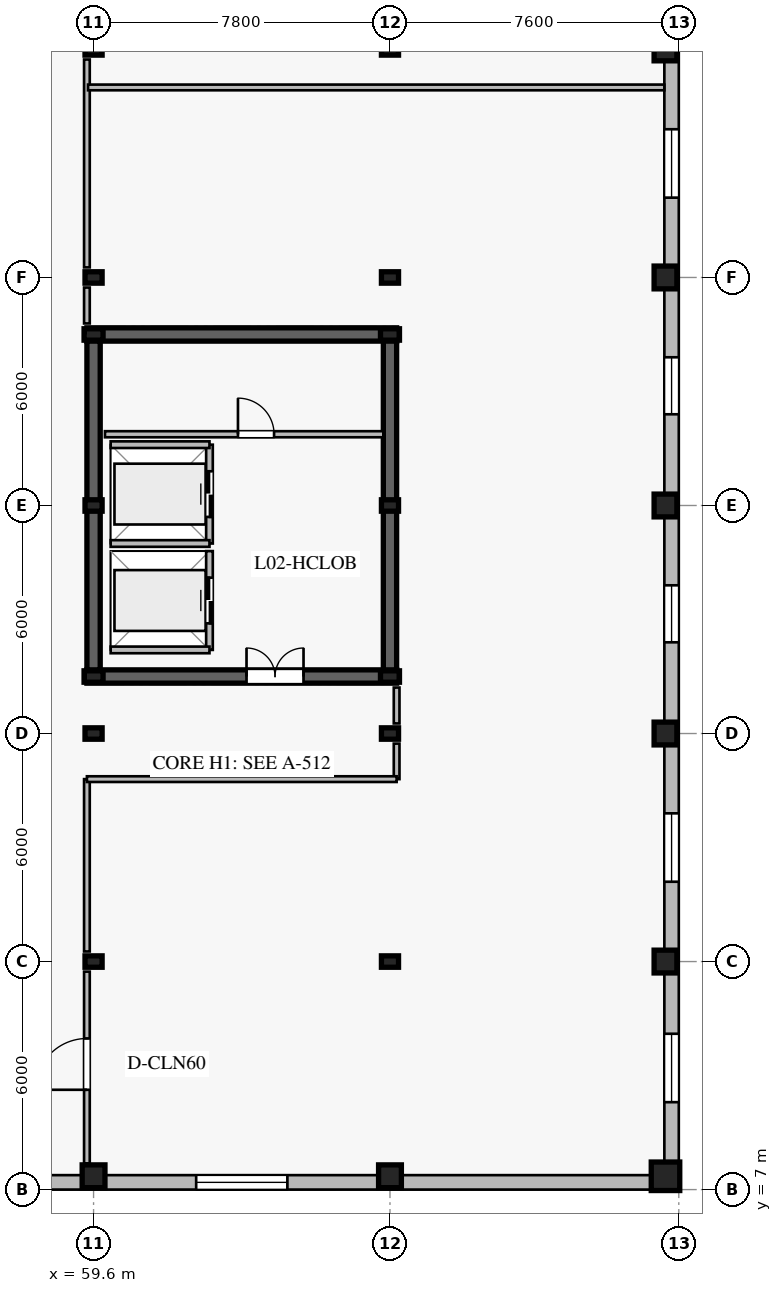
"""IFC4 building model, lengths in metres.
Left out: names, types, materials, properties, quantities, classifications, styles, units other than length and angle.
Written with IfcOpenShell. Run it as: python <this file> out.ifc"""

import sys

from ifc_helpers import new_model, si_unit, direction, frame, frame_2d, origin, origin_2d, place, context, subcontext, project, spatial, rectangle, i_section, extrude, element, fill, save


model = new_model("IFC4")
c1 = context("Model", 3, precision=1e-05, world=origin(), true_north=direction((0.0, 1.0)))
c2 = subcontext(c1, "Body", "Model", "MODEL_VIEW")
j1 = project(units=[si_unit("LENGTHUNIT", "METRE"), si_unit("PLANEANGLEUNIT", "RADIAN")], contexts=[c1])
p1 = place(None, origin())
s1 = spatial("IfcSite", under=j1, at=p1, CompositionType="ELEMENT")
p2 = place(p1, origin())
s2 = spatial("IfcBuilding", under=s1, at=p2, CompositionType="ELEMENT")
p3 = place(p2, frame((0.0, 0.0, 9.8)))
s3 = spatial("IfcBuildingStorey", under=s2, at=p3, CompositionType="ELEMENT", Elevation=9.8)
p4 = place(p3, frame((59.425, 20.5, 0.0), z_axis=(0.0, 0.0, 1.0), x_axis=(1.0, 0.0, 0.0)))
e1 = element("IfcWall", 1, at=p4, inside=s3, PredefinedType="SHEAR", context=c2, shape_type="SweptSolid", body=[
    extrude(rectangle(XDim=8.15, YDim=0.35, at=frame_2d((4.075, 0.0))), origin(), (0.0, 0.0, 1.0), 4.34),
])
p5 = place(p4, frame((4.2, 0.0, 0.0)))
e2 = element("IfcOpeningElement", 2, at=p5, cuts=e1, PredefinedType="OPENING", context=c2, shape_type="SweptSolid", body=[
    extrude(rectangle(XDim=1.5, YDim=2.2, at=frame_2d((0.75, 1.1))), frame((0.0, 0.185, 0.0), z_axis=(0.0, -1.0, 0.0), x_axis=(1.0, 0.0, 0.0)), (0.0, 0.0, 1.0), 0.37),
])
p6 = place(p3, frame((67.575, 29.5, 0.0), z_axis=(0.0, 0.0, 1.0), x_axis=(-1.0, 0.0, 0.0)))
e3 = element("IfcWall", 3, at=p6, inside=s3, PredefinedType="SHEAR", context=c2, shape_type="SweptSolid", body=[
    extrude(rectangle(XDim=8.15, YDim=0.35, at=frame_2d((4.075, 0.0))), origin(), (0.0, 0.0, 1.0), 4.34),
])
for number, where, z_axis, x_axis in (
    (4, (59.6, 29.325, 0.0), (0.0, 0.0, 1.0), (0.0, -1.0, 0.0)),
    (5, (67.4, 20.675, 0.0), (0.0, 0.0, 1.0), (0.0, 1.0, 0.0)),
):
    element("IfcWall", number, at=place(p3, frame(where, z_axis=z_axis, x_axis=x_axis)), inside=s3, PredefinedType="SHEAR", context=c2, shape_type="SweptSolid", body=[
        extrude(rectangle(XDim=8.65, YDim=0.35, at=frame_2d((4.325, 0.0))), origin(), (0.0, 0.0, 1.0), 4.34),
    ])
for number, where, z_axis, x_axis in (
    (6, (59.6, 20.5, 0.0), (0.0, 0.0, 1.0), (1.0, 0.0, 0.0)),
    (7, (67.4, 20.5, 0.0), (0.0, 0.0, 1.0), (1.0, 0.0, 0.0)),
    (8, (67.4, 29.5, 0.0), (0.0, 0.0, 1.0), (1.0, 0.0, 0.0)),
    (9, (59.6, 29.5, 0.0), (0.0, 0.0, 1.0), (1.0, 0.0, 0.0)),
):
    element("IfcColumn", number, at=place(p3, frame(where, z_axis=z_axis, x_axis=x_axis)), inside=s3, PredefinedType="COLUMN", context=c2, shape_type="SweptSolid", body=[
        extrude(i_section(OverallWidth=0.3, OverallDepth=0.5, WebThickness=0.014, FlangeThickness=0.028, at=origin_2d()), origin(), (0.0, 0.0, 1.0), 4.6),
    ])
p7 = place(p3, frame((59.6, 7.35, 0.0), z_axis=(0.0, 0.0, 1.0), x_axis=(1.0, 0.0, 0.0)))
e10 = element("IfcColumn", 10, at=p7, inside=s3, PredefinedType="COLUMN", context=c2, shape_type="SweptSolid", body=[
    extrude(rectangle(XDim=0.6, YDim=0.6, at=origin_2d()), origin(), (0.0, 0.0, 1.0), 4.6),
])
for number, where, z_axis, x_axis in (
    (11, (59.6, 13.0, 0.0), (0.0, 0.0, 1.0), (1.0, 0.0, 0.0)),
    (12, (59.6, 19.0, 0.0), (0.0, 0.0, 1.0), (1.0, 0.0, 0.0)),
    (13, (59.6, 25.0, 0.0), (0.0, 0.0, 1.0), (1.0, 0.0, 0.0)),
    (14, (59.6, 31.0, 0.0), (0.0, 0.0, 1.0), (1.0, 0.0, 0.0)),
    (15, (59.6, 37.0, 0.0), (0.0, 0.0, 1.0), (1.0, 0.0, 0.0)),
):
    element("IfcColumn", number, at=place(p3, frame(where, z_axis=z_axis, x_axis=x_axis)), inside=s3, PredefinedType="COLUMN", context=c2, shape_type="SweptSolid", body=[
        extrude(i_section(OverallWidth=0.3, OverallDepth=0.45, WebThickness=0.014, FlangeThickness=0.026, at=origin_2d()), origin(), (0.0, 0.0, 1.0), 4.6),
    ])
p8 = place(p3, frame((67.4, 7.35, 0.0), z_axis=(0.0, 0.0, 1.0), x_axis=(1.0, 0.0, 0.0)))
e16 = element("IfcColumn", 16, at=p8, inside=s3, PredefinedType="COLUMN", context=c2, shape_type="SweptSolid", body=[
    extrude(rectangle(XDim=0.6, YDim=0.6, at=origin_2d()), origin(), (0.0, 0.0, 1.0), 4.6),
])
for number, where, z_axis, x_axis in (
    (17, (67.4, 13.0, 0.0), (0.0, 0.0, 1.0), (1.0, 0.0, 0.0)),
    (18, (67.4, 19.0, 0.0), (0.0, 0.0, 1.0), (1.0, 0.0, 0.0)),
    (19, (67.4, 25.0, 0.0), (0.0, 0.0, 1.0), (1.0, 0.0, 0.0)),
    (20, (67.4, 31.0, 0.0), (0.0, 0.0, 1.0), (1.0, 0.0, 0.0)),
    (21, (67.4, 37.0, 0.0), (0.0, 0.0, 1.0), (1.0, 0.0, 0.0)),
):
    element("IfcColumn", number, at=place(p3, frame(where, z_axis=z_axis, x_axis=x_axis)), inside=s3, PredefinedType="COLUMN", context=c2, shape_type="SweptSolid", body=[
        extrude(i_section(OverallWidth=0.3, OverallDepth=0.45, WebThickness=0.014, FlangeThickness=0.026, at=origin_2d()), origin(), (0.0, 0.0, 1.0), 4.6),
    ])
p9 = place(p3, frame((74.65, 7.35, 0.0), z_axis=(0.0, 0.0, 1.0), x_axis=(1.0, 0.0, 0.0)))
e22 = element("IfcColumn", 22, at=p9, inside=s3, PredefinedType="COLUMN", context=c2, shape_type="SweptSolid", body=[
    extrude(rectangle(XDim=0.75, YDim=0.75, at=origin_2d()), origin(), (0.0, 0.0, 1.0), 4.6),
])
for number, where, z_axis, x_axis in (
    (23, (74.65, 13.0, 0.0), (0.0, 0.0, 1.0), (1.0, 0.0, 0.0)),
    (24, (74.65, 19.0, 0.0), (0.0, 0.0, 1.0), (1.0, 0.0, 0.0)),
    (25, (74.65, 25.0, 0.0), (0.0, 0.0, 1.0), (1.0, 0.0, 0.0)),
    (26, (74.65, 31.0, 0.0), (0.0, 0.0, 1.0), (1.0, 0.0, 0.0)),
    (27, (74.65, 37.0, 0.0), (0.0, 0.0, 1.0), (1.0, 0.0, 0.0)),
):
    element("IfcColumn", number, at=place(p3, frame(where, z_axis=z_axis, x_axis=x_axis)), inside=s3, PredefinedType="COLUMN", context=c2, shape_type="SweptSolid", body=[
        extrude(rectangle(XDim=0.6, YDim=0.6, at=origin_2d()), origin(), (0.0, 0.0, 1.0), 4.6),
    ])
p10 = place(p3, frame((75.0, 7.19, 0.0), z_axis=(0.0, 0.0, 1.0), x_axis=(-1.0, 0.0, 0.0)))
e28 = element("IfcWall", 28, at=p10, inside=s3, PredefinedType="STANDARD", context=c2, shape_type="SweptSolid", body=[
    extrude(rectangle(XDim=23.0, YDim=0.38, at=frame_2d((11.5, 0.0))), origin(), (0.0, 0.0, 1.0), 4.34),
])
p11 = place(p10, frame((10.3, 0.0, 0.95)))
e29 = element("IfcOpeningElement", 29, at=p11, cuts=e28, PredefinedType="OPENING", context=c2, shape_type="SweptSolid", body=[
    extrude(rectangle(XDim=2.4, YDim=1.8, at=frame_2d((1.2, 0.9))), frame((0.0, 0.2, 0.0), z_axis=(0.0, -1.0, 0.0), x_axis=(1.0, 0.0, 0.0)), (0.0, 0.0, 1.0), 0.4),
])
p12 = place(p3, frame((74.81, 42.62, 0.0), z_axis=(0.0, 0.0, 1.0), x_axis=(0.0, -1.0, 0.0)))
e30 = element("IfcWall", 30, at=p12, inside=s3, PredefinedType="STANDARD", context=c2, shape_type="SweptSolid", body=[
    extrude(rectangle(XDim=35.24, YDim=0.38, at=frame_2d((17.62, 0.0))), origin(), (0.0, 0.0, 1.0), 4.34),
])
p13 = place(p12, frame((31.52, 0.0, 0.9)))
e31 = element("IfcOpeningElement", 31, at=p13, cuts=e30, PredefinedType="OPENING", context=c2, shape_type="SweptSolid", body=[
    extrude(rectangle(XDim=1.8, YDim=1.8, at=frame_2d((0.9, 0.9))), frame((0.0, 0.2, 0.0), z_axis=(0.0, -1.0, 0.0), x_axis=(1.0, 0.0, 0.0)), (0.0, 0.0, 1.0), 0.4),
])
p14 = place(p12, frame((25.72, 0.0, 0.9)))
e32 = element("IfcOpeningElement", 32, at=p14, cuts=e30, PredefinedType="OPENING", context=c2, shape_type="SweptSolid", body=[
    extrude(rectangle(XDim=1.8, YDim=1.8, at=frame_2d((0.9, 0.9))), frame((0.0, 0.2, 0.0), z_axis=(0.0, -1.0, 0.0), x_axis=(1.0, 0.0, 0.0)), (0.0, 0.0, 1.0), 0.4),
])
p15 = place(p12, frame((19.72, 0.0, 0.9)))
e33 = element("IfcOpeningElement", 33, at=p15, cuts=e30, PredefinedType="OPENING", context=c2, shape_type="SweptSolid", body=[
    extrude(rectangle(XDim=1.5, YDim=1.5, at=frame_2d((0.75, 0.75))), frame((0.0, 0.2, 0.0), z_axis=(0.0, -1.0, 0.0), x_axis=(1.0, 0.0, 0.0)), (0.0, 0.0, 1.0), 0.4),
])
p16 = place(p12, frame((13.72, 0.0, 0.9)))
e34 = element("IfcOpeningElement", 34, at=p16, cuts=e30, PredefinedType="OPENING", context=c2, shape_type="SweptSolid", body=[
    extrude(rectangle(XDim=1.5, YDim=1.5, at=frame_2d((0.75, 0.75))), frame((0.0, 0.2, 0.0), z_axis=(0.0, -1.0, 0.0), x_axis=(1.0, 0.0, 0.0)), (0.0, 0.0, 1.0), 0.4),
])
p17 = place(p12, frame((7.72, 0.0, 0.9)))
e35 = element("IfcOpeningElement", 35, at=p17, cuts=e30, PredefinedType="OPENING", context=c2, shape_type="SweptSolid", body=[
    extrude(rectangle(XDim=1.8, YDim=1.8, at=frame_2d((0.9, 0.9))), frame((0.0, 0.2, 0.0), z_axis=(0.0, -1.0, 0.0), x_axis=(1.0, 0.0, 0.0)), (0.0, 0.0, 1.0), 0.4),
])
p18 = place(p12, frame((1.92, 0.0, 0.9)))
e36 = element("IfcOpeningElement", 36, at=p18, cuts=e30, PredefinedType="OPENING", context=c2, shape_type="SweptSolid", body=[
    extrude(rectangle(XDim=1.8, YDim=1.8, at=frame_2d((0.9, 0.9))), frame((0.0, 0.2, 0.0), z_axis=(0.0, -1.0, 0.0), x_axis=(1.0, 0.0, 0.0)), (0.0, 0.0, 1.0), 0.4),
])
p19 = place(p3, frame((62.65, 21.2, 0.0), z_axis=(0.0, 0.0, 1.0), x_axis=(0.0, 1.0, 0.0)))
e37 = element("IfcWall", 37, at=p19, inside=s3, PredefinedType="PARTITIONING", context=c2, shape_type="SweptSolid", body=[
    extrude(rectangle(XDim=2.6, YDim=0.175, at=frame_2d((1.3, 0.0))), origin(), (0.0, 0.0, 1.0), 4.34),
])
p20 = place(p19, frame((0.7, 0.0, 0.0)))
e38 = element("IfcOpeningElement", 38, at=p20, cuts=e37, PredefinedType="OPENING", context=c2, shape_type="SweptSolid", body=[
    extrude(rectangle(XDim=1.2, YDim=2.2, at=frame_2d((0.6, 1.1))), frame((0.0, 0.098, 0.0), z_axis=(0.0, -1.0, 0.0), x_axis=(1.0, 0.0, 0.0)), (0.0, 0.0, 1.0), 0.195),
])
p21 = place(p3, frame((60.05, 21.2, 0.0), z_axis=(0.0, 0.0, 1.0), x_axis=(1.0, 0.0, 0.0)))
e39 = element("IfcWall", 39, at=p21, inside=s3, PredefinedType="PARTITIONING", context=c2, shape_type="SweptSolid", body=[
    extrude(rectangle(XDim=2.6, YDim=0.175, at=frame_2d((1.3, 0.0))), origin(), (0.0, 0.0, 1.0), 4.34),
])
p22 = place(p3, frame((62.65, 24.0, 0.0), z_axis=(0.0, 0.0, 1.0), x_axis=(0.0, 1.0, 0.0)))
e40 = element("IfcWall", 40, at=p22, inside=s3, PredefinedType="PARTITIONING", context=c2, shape_type="SweptSolid", body=[
    extrude(rectangle(XDim=2.6, YDim=0.175, at=frame_2d((1.3, 0.0))), origin(), (0.0, 0.0, 1.0), 3.98),
])
p23 = place(p22, frame((0.7, 0.0, 0.0)))
e41 = element("IfcOpeningElement", 41, at=p23, cuts=e40, PredefinedType="OPENING", context=c2, shape_type="SweptSolid", body=[
    extrude(rectangle(XDim=1.2, YDim=2.2, at=frame_2d((0.6, 1.1))), frame((0.0, 0.098, 0.0), z_axis=(0.0, -1.0, 0.0), x_axis=(1.0, 0.0, 0.0)), (0.0, 0.0, 1.0), 0.195),
])
for number, where, z_axis, x_axis in (
    (42, (60.05, 24.0, 0.0), (0.0, 0.0, 1.0), (1.0, 0.0, 0.0)),
    (43, (60.05, 26.6, 0.0), (0.0, 0.0, 1.0), (1.0, 0.0, 0.0)),
):
    element("IfcWall", number, at=place(p3, frame(where, z_axis=z_axis, x_axis=x_axis)), inside=s3, PredefinedType="PARTITIONING", context=c2, shape_type="SweptSolid", body=[
        extrude(rectangle(XDim=2.6, YDim=0.175, at=frame_2d((1.3, 0.0))), origin(), (0.0, 0.0, 1.0), 4.34),
    ])
p24 = place(p3, frame((59.9, 26.875, 0.0), z_axis=(0.0, 0.0, 1.0), x_axis=(1.0, 0.0, 0.0)))
e44 = element("IfcWall", 44, at=p24, inside=s3, PredefinedType="PLUMBINGWALL", context=c2, shape_type="SweptSolid", body=[
    extrude(rectangle(XDim=7.325, YDim=0.16, at=frame_2d((3.663, 0.0))), origin(), (0.0, 0.0, 1.0), 3.98),
])
p25 = place(p24, frame((3.5, 0.0, 0.0)))
e45 = element("IfcOpeningElement", 45, at=p25, cuts=e44, PredefinedType="OPENING", context=c2, shape_type="SweptSolid", body=[
    extrude(rectangle(XDim=0.95, YDim=2.1, at=frame_2d((0.475, 1.05))), frame((0.0, 0.09, 0.0), z_axis=(0.0, -1.0, 0.0), x_axis=(1.0, 0.0, 0.0)), (0.0, 0.0, 1.0), 0.18),
])
p26 = place(p3, frame((59.425, 7.69, 0.0), z_axis=(0.0, 0.0, 1.0), x_axis=(0.0, 1.0, 0.0)))
e46 = element("IfcWall", 46, at=p26, inside=s3, PredefinedType="PARTITIONING", context=c2, shape_type="SweptSolid", body=[
    extrude(rectangle(XDim=5.045, YDim=0.15, at=frame_2d((2.522, 0.0))), origin(), (0.0, 0.0, 1.0), 3.98),
])
p27 = place(p26, frame((1.936, 0.0, 0.0)))
e47 = element("IfcOpeningElement", 47, at=p27, cuts=e46, PredefinedType="OPENING", context=c2, shape_type="SweptSolid", body=[
    extrude(rectangle(XDim=1.35, YDim=2.2, at=frame_2d((0.675, 1.1))), frame((0.0, 0.085, 0.0), z_axis=(0.0, -1.0, 0.0), x_axis=(1.0, 0.0, 0.0)), (0.0, 0.0, 1.0), 0.17),
])
p28 = place(p3, frame((59.425, 13.265, 0.0), z_axis=(0.0, 0.0, 1.0), x_axis=(0.0, 1.0, 0.0)))
e48 = element("IfcWall", 48, at=p28, inside=s3, PredefinedType="PARTITIONING", context=c2, shape_type="SweptSolid", body=[
    extrude(rectangle(XDim=4.535, YDim=0.15, at=frame_2d((2.268, 0.0))), origin(), (0.0, 0.0, 1.0), 3.98),
])
p29 = place(p3, frame((59.425, 29.79, 0.0), z_axis=(0.0, 0.0, 1.0), x_axis=(0.0, 1.0, 0.0)))
e49 = element("IfcWall", 49, at=p29, inside=s3, PredefinedType="PARTITIONING", context=c2, shape_type="SweptSolid", body=[
    extrude(rectangle(XDim=0.945, YDim=0.15, at=frame_2d((0.473, 0.0))), origin(), (0.0, 0.0, 1.0), 3.98),
])
p30 = place(p3, frame((59.425, 31.265, 0.0), z_axis=(0.0, 0.0, 1.0), x_axis=(0.0, 1.0, 0.0)))
e50 = element("IfcWall", 50, at=p30, inside=s3, PredefinedType="PARTITIONING", context=c2, shape_type="SweptSolid", body=[
    extrude(rectangle(XDim=5.47, YDim=0.15, at=frame_2d((2.735, 0.0))), origin(), (0.0, 0.0, 1.0), 3.98),
])
p31 = place(p3, frame((67.575, 17.8, 0.0), z_axis=(0.0, 0.0, 1.0), x_axis=(0.0, 1.0, 0.0)))
e51 = element("IfcWall", 51, at=p31, inside=s3, PredefinedType="PARTITIONING", context=c2, shape_type="SweptSolid", body=[
    extrude(rectangle(XDim=0.935, YDim=0.15, at=frame_2d((0.468, 0.0))), origin(), (0.0, 0.0, 1.0), 3.98),
])
p32 = place(p3, frame((67.575, 19.265, 0.0), z_axis=(0.0, 0.0, 1.0), x_axis=(0.0, 1.0, 0.0)))
e52 = element("IfcWall", 52, at=p32, inside=s3, PredefinedType="PARTITIONING", context=c2, shape_type="SweptSolid", body=[
    extrude(rectangle(XDim=0.945, YDim=0.15, at=frame_2d((0.473, 0.0))), origin(), (0.0, 0.0, 1.0), 3.98),
])
p33 = place(p3, frame((59.425, 17.8, 0.0), z_axis=(0.0, 0.0, 1.0), x_axis=(1.0, 0.0, 0.0)))
e53 = element("IfcWall", 53, at=p33, inside=s3, PredefinedType="PARTITIONING", context=c2, shape_type="SweptSolid", body=[
    extrude(rectangle(XDim=8.15, YDim=0.15, at=frame_2d((4.075, 0.0))), origin(), (0.0, 0.0, 1.0), 3.98),
])
p34 = place(p3, frame((59.455, 36.0, 0.0), z_axis=(0.0, 0.0, 1.0), x_axis=(1.0, 0.0, 0.0)))
e54 = element("IfcWall", 54, at=p34, inside=s3, PredefinedType="PARTITIONING", context=c2, shape_type="SweptSolid", body=[
    extrude(rectangle(XDim=15.165, YDim=0.15, at=frame_2d((7.583, 0.0))), origin(), (0.0, 0.0, 1.0), 3.98),
])
p35 = place(p13, origin())
e55 = element("IfcWindow", 55, at=p35, inside=s3, PartitioningType="DOUBLE_PANEL_VERTICAL", PredefinedType="WINDOW", context=c2, shape_type="SweptSolid", body=[
    extrude(rectangle(XDim=1.8, YDim=1.8, at=frame_2d((0.9, 0.9))), frame((0.0, 0.03, 0.0), z_axis=(0.0, -1.0, 0.0), x_axis=(1.0, 0.0, 0.0)), (0.0, 0.0, 1.0), 0.06),
])
fill(e31, e55)
p36 = place(p14, origin())
e56 = element("IfcWindow", 56, at=p36, inside=s3, PartitioningType="DOUBLE_PANEL_VERTICAL", PredefinedType="WINDOW", context=c2, shape_type="SweptSolid", body=[
    extrude(rectangle(XDim=1.8, YDim=1.8, at=frame_2d((0.9, 0.9))), frame((0.0, 0.03, 0.0), z_axis=(0.0, -1.0, 0.0), x_axis=(1.0, 0.0, 0.0)), (0.0, 0.0, 1.0), 0.06),
])
fill(e32, e56)
p37 = place(p15, origin())
e57 = element("IfcWindow", 57, at=p37, inside=s3, PartitioningType="SINGLE_PANEL", PredefinedType="WINDOW", context=c2, shape_type="SweptSolid", body=[
    extrude(rectangle(XDim=1.5, YDim=1.5, at=frame_2d((0.75, 0.75))), frame((0.0, 0.03, 0.0), z_axis=(0.0, -1.0, 0.0), x_axis=(1.0, 0.0, 0.0)), (0.0, 0.0, 1.0), 0.06),
])
fill(e33, e57)
p38 = place(p16, origin())
e58 = element("IfcWindow", 58, at=p38, inside=s3, PartitioningType="SINGLE_PANEL", PredefinedType="WINDOW", context=c2, shape_type="SweptSolid", body=[
    extrude(rectangle(XDim=1.5, YDim=1.5, at=frame_2d((0.75, 0.75))), frame((0.0, 0.03, 0.0), z_axis=(0.0, -1.0, 0.0), x_axis=(1.0, 0.0, 0.0)), (0.0, 0.0, 1.0), 0.06),
])
fill(e34, e58)
p39 = place(p17, origin())
e59 = element("IfcWindow", 59, at=p39, inside=s3, PartitioningType="DOUBLE_PANEL_VERTICAL", PredefinedType="WINDOW", context=c2, shape_type="SweptSolid", body=[
    extrude(rectangle(XDim=1.8, YDim=1.8, at=frame_2d((0.9, 0.9))), frame((0.0, 0.03, 0.0), z_axis=(0.0, -1.0, 0.0), x_axis=(1.0, 0.0, 0.0)), (0.0, 0.0, 1.0), 0.06),
])
fill(e35, e59)
p40 = place(p11, origin())
e60 = element("IfcWindow", 60, at=p40, inside=s3, PartitioningType="TRIPLE_PANEL_VERTICAL", PredefinedType="WINDOW", context=c2, shape_type="SweptSolid", body=[
    extrude(rectangle(XDim=2.4, YDim=1.8, at=frame_2d((1.2, 0.9))), frame((0.0, 0.03, 0.0), z_axis=(0.0, -1.0, 0.0), x_axis=(1.0, 0.0, 0.0)), (0.0, 0.0, 1.0), 0.06),
])
fill(e29, e60)
p41 = place(p20, origin())
e61 = element("IfcDoor", 61, at=p41, inside=s3, OperationType="DOUBLE_DOOR_SLIDING", PredefinedType="DOOR", context=c2, shape_type="SweptSolid", body=[
    extrude(rectangle(XDim=1.2, YDim=2.2, at=frame_2d((0.6, 1.1))), frame((0.0, 0.025, 0.0), z_axis=(0.0, -1.0, 0.0), x_axis=(1.0, 0.0, 0.0)), (0.0, 0.0, 1.0), 0.05),
])
fill(e38, e61)
p42 = place(p23, origin())
e62 = element("IfcDoor", 62, at=p42, inside=s3, OperationType="DOUBLE_DOOR_SLIDING", PredefinedType="DOOR", context=c2, shape_type="SweptSolid", body=[
    extrude(rectangle(XDim=1.2, YDim=2.2, at=frame_2d((0.6, 1.1))), frame((0.0, 0.025, 0.0), z_axis=(0.0, -1.0, 0.0), x_axis=(1.0, 0.0, 0.0)), (0.0, 0.0, 1.0), 0.05),
])
fill(e41, e62)
p43 = place(p5, origin())
e63 = element("IfcDoor", 63, at=p43, inside=s3, OperationType="DOUBLE_DOOR_SINGLE_SWING", PredefinedType="DOOR", context=c2, shape_type="SweptSolid", body=[
    extrude(rectangle(XDim=1.5, YDim=2.2, at=frame_2d((0.75, 1.1))), frame((0.0, 0.025, 0.0), z_axis=(0.0, -1.0, 0.0), x_axis=(1.0, 0.0, 0.0)), (0.0, 0.0, 1.0), 0.05),
])
fill(e2, e63)
p44 = place(p25, origin())
e64 = element("IfcDoor", 64, at=p44, inside=s3, OperationType="SINGLE_SWING_LEFT", PredefinedType="DOOR", context=c2, shape_type="SweptSolid", body=[
    extrude(rectangle(XDim=0.95, YDim=2.1, at=frame_2d((0.475, 1.05))), frame((0.0, 0.025, 0.0), z_axis=(0.0, -1.0, 0.0), x_axis=(1.0, 0.0, 0.0)), (0.0, 0.0, 1.0), 0.05),
])
fill(e45, e64)
p45 = place(p27, origin())
e65 = element("IfcDoor", 65, at=p45, inside=s3, OperationType="SINGLE_SWING_LEFT", PredefinedType="DOOR", context=c2, shape_type="SweptSolid", body=[
    extrude(rectangle(XDim=1.35, YDim=2.2, at=frame_2d((0.675, 1.1))), frame((0.0, 0.025, 0.0), z_axis=(0.0, -1.0, 0.0), x_axis=(1.0, 0.0, 0.0)), (0.0, 0.0, 1.0), 0.05),
])
fill(e47, e65)
save(model, sys.argv[1])
